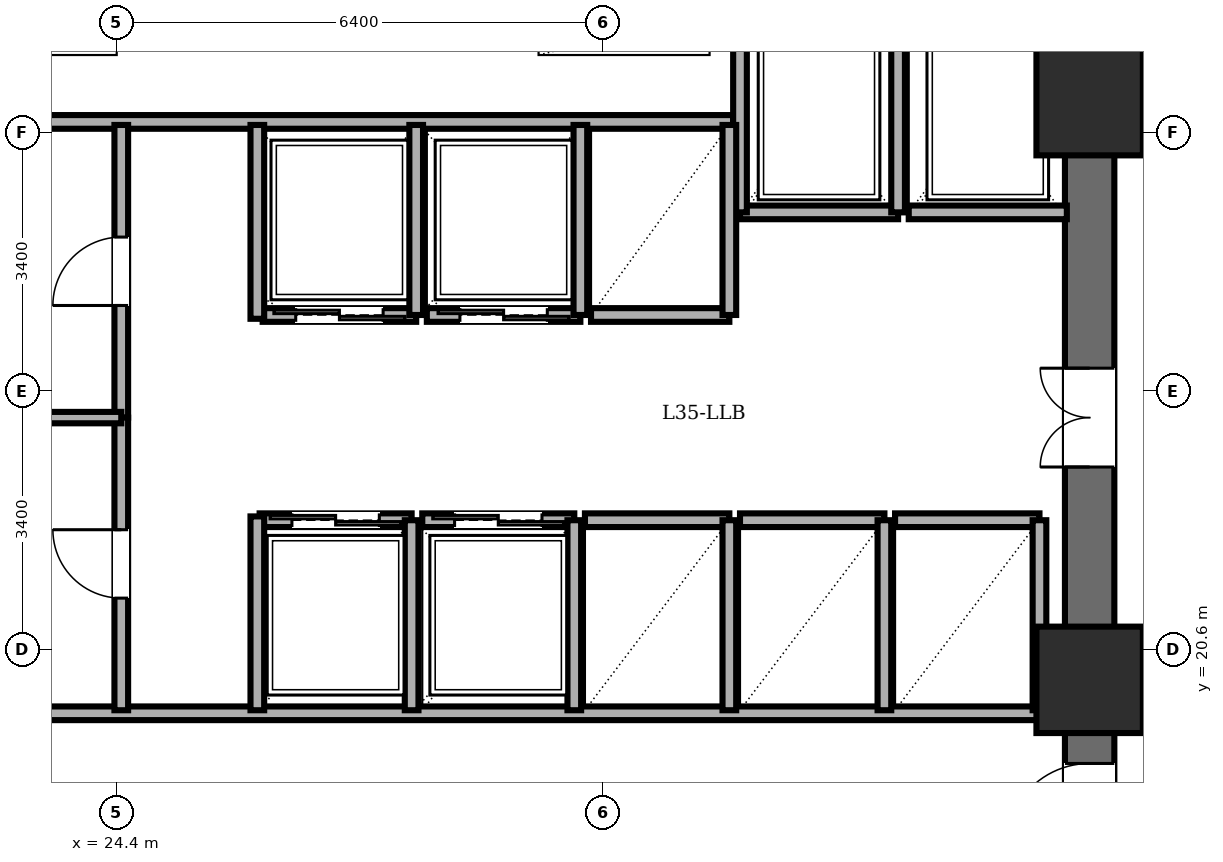
"""IFC4 building model, lengths in metres.
Left out: names, types, materials, properties, quantities, classifications, styles, units other than length and angle.
Written with IfcOpenShell. Run it as: python <this file> out.ifc"""

import sys

from ifc_helpers import new_model, si_unit, direction, frame, frame_2d, origin, origin_2d, place, context, subcontext, project, spatial, rectangle, extrude, element, fill, save


model = new_model("IFC4")
c1 = context("Model", 3, precision=1e-05, world=origin(), true_north=direction((0.0, 1.0)))
c2 = subcontext(c1, "Body", "Model", "MODEL_VIEW")
j1 = project(units=[si_unit("LENGTHUNIT", "METRE"), si_unit("PLANEANGLEUNIT", "RADIAN")], contexts=[c1])
p1 = place(None, origin())
s1 = spatial("IfcSite", under=j1, at=p1, CompositionType="ELEMENT")
p2 = place(p1, origin())
s2 = spatial("IfcBuilding", under=s1, at=p2, CompositionType="ELEMENT")
p3 = place(p2, frame((0.0, 0.0, 133.1)))
s3 = spatial("IfcBuildingStorey", under=s2, at=p3, CompositionType="ELEMENT", Elevation=133.1)
for number, where, z_axis, x_axis in (
    (1, (37.2, 20.2, 0.0), (0.0, 0.0, 1.0), (1.0, 0.0, 0.0)),
    (2, (37.2, 27.8, 0.0), (0.0, 0.0, 1.0), (1.0, 0.0, 0.0)),
):
    element("IfcColumn", number, at=place(p3, frame(where, z_axis=z_axis, x_axis=x_axis)), inside=s3, PredefinedType="COLUMN", context=c2, shape_type="SweptSolid", body=[
        extrude(rectangle(XDim=1.4, YDim=1.4, at=origin_2d()), origin(), (0.0, 0.0, 1.0), 5.6),
    ])
p4 = place(p3, frame((37.2, 14.4, 0.0), z_axis=(0.0, 0.0, 1.0), x_axis=(0.0, 1.0, 0.0)))
e3 = element("IfcWall", 3, at=p4, inside=s3, PredefinedType="SHEAR", context=c2, shape_type="SweptSolid", body=[
    extrude(rectangle(XDim=19.2, YDim=0.65, at=frame_2d((9.6, 0.0))), origin(), (0.0, 0.0, 1.0), 5.36),
])
p5 = place(p4, frame((15.8, 0.0, 0.0)))
e4 = element("IfcOpeningElement", 4, at=p5, cuts=e3, PredefinedType="OPENING", context=c2, shape_type="SweptSolid", body=[
    extrude(rectangle(XDim=1.15, YDim=2.15, at=frame_2d((0.575, 1.075))), frame((0.0, 0.335, 0.0), z_axis=(0.0, -1.0, 0.0), x_axis=(1.0, 0.0, 0.0)), (0.0, 0.0, 1.0), 0.67),
])
p6 = place(p4, frame((3.6, 0.0, 0.0)))
e5 = element("IfcOpeningElement", 5, at=p6, cuts=e3, PredefinedType="OPENING", context=c2, shape_type="SweptSolid", body=[
    extrude(rectangle(XDim=1.1, YDim=2.15, at=frame_2d((0.55, 1.075))), frame((0.0, 0.335, 0.0), z_axis=(0.0, -1.0, 0.0), x_axis=(1.0, 0.0, 0.0)), (0.0, 0.0, 1.0), 0.67),
])
p7 = place(p4, frame((8.6, 0.0, 0.0)))
e6 = element("IfcOpeningElement", 6, at=p7, cuts=e3, PredefinedType="OPENING", context=c2, shape_type="SweptSolid", body=[
    extrude(rectangle(XDim=1.3, YDim=2.2, at=frame_2d((0.65, 1.1))), frame((0.0, 0.335, 0.0), z_axis=(0.0, -1.0, 0.0), x_axis=(1.0, 0.0, 0.0)), (0.0, 0.0, 1.0), 0.67),
])
p8 = place(p3, frame((21.95, 27.54, 0.0), z_axis=(0.0, 0.0, 1.0), x_axis=(1.0, 0.0, 0.0)))
e7 = element("IfcWall", 7, at=p8, inside=s3, PredefinedType="PARTITIONING", context=c2, shape_type="SweptSolid", body=[
    extrude(rectangle(XDim=10.56, YDim=0.18, at=frame_2d((5.28, 0.0))), origin(), (0.0, 0.0, 1.0), 5.36),
])
p9 = place(p3, frame((21.95, 19.76, 0.0), z_axis=(0.0, 0.0, 1.0), x_axis=(1.0, 0.0, 0.0)))
e8 = element("IfcWall", 8, at=p9, inside=s3, PredefinedType="PARTITIONING", context=c2, shape_type="SweptSolid", body=[
    extrude(rectangle(XDim=14.87, YDim=0.18, at=frame_2d((7.435, 0.0))), origin(), (0.0, 0.0, 1.0), 5.36),
])
p10 = place(p3, frame((34.68, 26.35, 0.0), z_axis=(0.0, 0.0, 1.0), x_axis=(-1.0, 0.0, 0.0)))
e9 = element("IfcWall", 9, at=p10, inside=s3, PredefinedType="PARTITIONING", context=c2, shape_type="SweptSolid", body=[
    extrude(rectangle(XDim=2.08, YDim=0.18, at=frame_2d((1.04, 0.0))), origin(), (0.0, 0.0, 1.0), 5.36),
])
for number, where, z_axis, x_axis in (
    (10, (34.68, 26.35, 0.0), (0.0, 0.0, 1.0), (0.0, 1.0, 0.0)),
    (11, (32.6, 29.08, 0.0), (0.0, 0.0, 1.0), (0.0, -1.0, 0.0)),
):
    element("IfcWall", number, at=place(p3, frame(where, z_axis=z_axis, x_axis=x_axis)), inside=s3, PredefinedType="PARTITIONING", context=c2, shape_type="SweptSolid", body=[
        extrude(rectangle(XDim=2.73, YDim=0.18, at=frame_2d((1.365, 0.0))), origin(), (0.0, 0.0, 1.0), 5.36),
    ])
p11 = place(p3, frame((36.9, 26.35, 0.0), z_axis=(0.0, 0.0, 1.0), x_axis=(-1.0, 0.0, 0.0)))
e12 = element("IfcWall", 12, at=p11, inside=s3, PredefinedType="PARTITIONING", context=c2, shape_type="SweptSolid", body=[
    extrude(rectangle(XDim=2.08, YDim=0.18, at=frame_2d((1.04, 0.0))), origin(), (0.0, 0.0, 1.0), 5.36),
])
p12 = place(p3, frame((28.34, 25.0, 0.0), z_axis=(0.0, 0.0, 1.0), x_axis=(-1.0, 0.0, 0.0)))
e13 = element("IfcWall", 13, at=p12, inside=s3, PredefinedType="PARTITIONING", context=c2, shape_type="SweptSolid", body=[
    extrude(rectangle(XDim=2.02, YDim=0.18, at=frame_2d((1.01, 0.0))), origin(), (0.0, 0.0, 1.0), 5.36),
])
p13 = place(p12, frame((0.435, 0.0, 0.0)))
e14 = element("IfcOpeningElement", 14, at=p13, cuts=e13, PredefinedType="OPENING", context=c2, shape_type="SweptSolid", body=[
    extrude(rectangle(XDim=1.15, YDim=2.2, at=frame_2d((0.575, 1.1))), frame((0.0, 0.1, 0.0), z_axis=(0.0, -1.0, 0.0), x_axis=(1.0, 0.0, 0.0)), (0.0, 0.0, 1.0), 0.2),
])
p14 = place(p3, frame((28.34, 25.0, 0.0), z_axis=(0.0, 0.0, 1.0), x_axis=(0.0, 1.0, 0.0)))
e15 = element("IfcWall", 15, at=p14, inside=s3, PredefinedType="PARTITIONING", context=c2, shape_type="SweptSolid", body=[
    extrude(rectangle(XDim=2.5, YDim=0.18, at=frame_2d((1.25, 0.0))), origin(), (0.0, 0.0, 1.0), 5.36),
])
p15 = place(p3, frame((30.5, 25.0, 0.0), z_axis=(0.0, 0.0, 1.0), x_axis=(-1.0, 0.0, 0.0)))
e16 = element("IfcWall", 16, at=p15, inside=s3, PredefinedType="PARTITIONING", context=c2, shape_type="SweptSolid", body=[
    extrude(rectangle(XDim=2.02, YDim=0.18, at=frame_2d((1.01, 0.0))), origin(), (0.0, 0.0, 1.0), 5.36),
])
p16 = place(p15, frame((0.435, 0.0, 0.0)))
e17 = element("IfcOpeningElement", 17, at=p16, cuts=e16, PredefinedType="OPENING", context=c2, shape_type="SweptSolid", body=[
    extrude(rectangle(XDim=1.15, YDim=2.2, at=frame_2d((0.575, 1.1))), frame((0.0, 0.1, 0.0), z_axis=(0.0, -1.0, 0.0), x_axis=(1.0, 0.0, 0.0)), (0.0, 0.0, 1.0), 0.2),
])
p17 = place(p3, frame((30.5, 25.0, 0.0), z_axis=(0.0, 0.0, 1.0), x_axis=(0.0, 1.0, 0.0)))
e18 = element("IfcWall", 18, at=p17, inside=s3, PredefinedType="PARTITIONING", context=c2, shape_type="SweptSolid", body=[
    extrude(rectangle(XDim=2.5, YDim=0.18, at=frame_2d((1.25, 0.0))), origin(), (0.0, 0.0, 1.0), 5.36),
])
p18 = place(p3, frame((26.28, 22.3, 0.0), z_axis=(0.0, 0.0, 1.0), x_axis=(1.0, 0.0, 0.0)))
e19 = element("IfcWall", 19, at=p18, inside=s3, PredefinedType="PARTITIONING", context=c2, shape_type="SweptSolid", body=[
    extrude(rectangle(XDim=2.0, YDim=0.18, at=frame_2d((1.0, 0.0))), origin(), (0.0, 0.0, 1.0), 5.36),
])
p19 = place(p18, frame((0.425, 0.0, 0.0)))
e20 = element("IfcOpeningElement", 20, at=p19, cuts=e19, PredefinedType="OPENING", context=c2, shape_type="SweptSolid", body=[
    extrude(rectangle(XDim=1.15, YDim=2.2, at=frame_2d((0.575, 1.1))), frame((0.0, 0.1, 0.0), z_axis=(0.0, -1.0, 0.0), x_axis=(1.0, 0.0, 0.0)), (0.0, 0.0, 1.0), 0.2),
])
p20 = place(p3, frame((28.28, 19.8, 0.0), z_axis=(0.0, 0.0, 1.0), x_axis=(0.0, 1.0, 0.0)))
e21 = element("IfcWall", 21, at=p20, inside=s3, PredefinedType="PARTITIONING", context=c2, shape_type="SweptSolid", body=[
    extrude(rectangle(XDim=2.5, YDim=0.18, at=frame_2d((1.25, 0.0))), origin(), (0.0, 0.0, 1.0), 5.36),
])
p21 = place(p3, frame((28.42, 22.3, 0.0), z_axis=(0.0, 0.0, 1.0), x_axis=(1.0, 0.0, 0.0)))
e22 = element("IfcWall", 22, at=p21, inside=s3, PredefinedType="PARTITIONING", context=c2, shape_type="SweptSolid", body=[
    extrude(rectangle(XDim=2.0, YDim=0.18, at=frame_2d((1.0, 0.0))), origin(), (0.0, 0.0, 1.0), 5.36),
])
p22 = place(p21, frame((0.425, 0.0, 0.0)))
e23 = element("IfcOpeningElement", 23, at=p22, cuts=e22, PredefinedType="OPENING", context=c2, shape_type="SweptSolid", body=[
    extrude(rectangle(XDim=1.15, YDim=2.2, at=frame_2d((0.575, 1.1))), frame((0.0, 0.1, 0.0), z_axis=(0.0, -1.0, 0.0), x_axis=(1.0, 0.0, 0.0)), (0.0, 0.0, 1.0), 0.2),
])
p23 = place(p3, frame((30.42, 19.8, 0.0), z_axis=(0.0, 0.0, 1.0), x_axis=(0.0, 1.0, 0.0)))
e24 = element("IfcWall", 24, at=p23, inside=s3, PredefinedType="PARTITIONING", context=c2, shape_type="SweptSolid", body=[
    extrude(rectangle(XDim=2.5, YDim=0.18, at=frame_2d((1.25, 0.0))), origin(), (0.0, 0.0, 1.0), 5.36),
])
p24 = place(p3, frame((32.46, 25.0, 0.0), z_axis=(0.0, 0.0, 1.0), x_axis=(-1.0, 0.0, 0.0)))
e25 = element("IfcWall", 25, at=p24, inside=s3, PredefinedType="PARTITIONING", context=c2, shape_type="SweptSolid", body=[
    extrude(rectangle(XDim=1.82, YDim=0.18, at=frame_2d((0.91, 0.0))), origin(), (0.0, 0.0, 1.0), 5.36),
])
p25 = place(p3, frame((32.46, 25.0, 0.0), z_axis=(0.0, 0.0, 1.0), x_axis=(0.0, 1.0, 0.0)))
e26 = element("IfcWall", 26, at=p25, inside=s3, PredefinedType="PARTITIONING", context=c2, shape_type="SweptSolid", body=[
    extrude(rectangle(XDim=2.5, YDim=0.18, at=frame_2d((1.25, 0.0))), origin(), (0.0, 0.0, 1.0), 5.36),
])
p26 = place(p3, frame((30.56, 22.3, 0.0), z_axis=(0.0, 0.0, 1.0), x_axis=(1.0, 0.0, 0.0)))
e27 = element("IfcWall", 27, at=p26, inside=s3, PredefinedType="PARTITIONING", context=c2, shape_type="SweptSolid", body=[
    extrude(rectangle(XDim=1.9, YDim=0.18, at=frame_2d((0.95, 0.0))), origin(), (0.0, 0.0, 1.0), 5.36),
])
p27 = place(p3, frame((32.46, 19.8, 0.0), z_axis=(0.0, 0.0, 1.0), x_axis=(0.0, 1.0, 0.0)))
e28 = element("IfcWall", 28, at=p27, inside=s3, PredefinedType="PARTITIONING", context=c2, shape_type="SweptSolid", body=[
    extrude(rectangle(XDim=2.5, YDim=0.18, at=frame_2d((1.25, 0.0))), origin(), (0.0, 0.0, 1.0), 5.36),
])
p28 = place(p3, frame((32.6, 22.3, 0.0), z_axis=(0.0, 0.0, 1.0), x_axis=(1.0, 0.0, 0.0)))
e29 = element("IfcWall", 29, at=p28, inside=s3, PredefinedType="PARTITIONING", context=c2, shape_type="SweptSolid", body=[
    extrude(rectangle(XDim=1.9, YDim=0.18, at=frame_2d((0.95, 0.0))), origin(), (0.0, 0.0, 1.0), 5.36),
])
p29 = place(p3, frame((34.5, 19.8, 0.0), z_axis=(0.0, 0.0, 1.0), x_axis=(0.0, 1.0, 0.0)))
e30 = element("IfcWall", 30, at=p29, inside=s3, PredefinedType="PARTITIONING", context=c2, shape_type="SweptSolid", body=[
    extrude(rectangle(XDim=2.5, YDim=0.18, at=frame_2d((1.25, 0.0))), origin(), (0.0, 0.0, 1.0), 5.36),
])
p30 = place(p3, frame((34.64, 22.3, 0.0), z_axis=(0.0, 0.0, 1.0), x_axis=(1.0, 0.0, 0.0)))
e31 = element("IfcWall", 31, at=p30, inside=s3, PredefinedType="PARTITIONING", context=c2, shape_type="SweptSolid", body=[
    extrude(rectangle(XDim=1.9, YDim=0.18, at=frame_2d((0.95, 0.0))), origin(), (0.0, 0.0, 1.0), 5.36),
])
p31 = place(p3, frame((36.54, 19.8, 0.0), z_axis=(0.0, 0.0, 1.0), x_axis=(0.0, 1.0, 0.0)))
e32 = element("IfcWall", 32, at=p31, inside=s3, PredefinedType="PARTITIONING", context=c2, shape_type="SweptSolid", body=[
    extrude(rectangle(XDim=2.5, YDim=0.18, at=frame_2d((1.25, 0.0))), origin(), (0.0, 0.0, 1.0), 5.36),
])
p32 = place(p3, frame((24.46, 23.65, 0.0), z_axis=(0.0, 0.0, 1.0), x_axis=(0.0, 1.0, 0.0)))
e33 = element("IfcWall", 33, at=p32, inside=s3, PredefinedType="PARTITIONING", context=c2, shape_type="SweptSolid", body=[
    extrude(rectangle(XDim=3.85, YDim=0.18, at=frame_2d((1.925, 0.0))), origin(), (0.0, 0.0, 1.0), 5.36),
])
p33 = place(p32, frame((1.475, 0.0, 0.0)))
e34 = element("IfcOpeningElement", 34, at=p33, cuts=e33, PredefinedType="OPENING", context=c2, shape_type="SweptSolid", body=[
    extrude(rectangle(XDim=0.9, YDim=2.05, at=frame_2d((0.45, 1.025))), frame((0.0, 0.1, 0.0), z_axis=(0.0, -1.0, 0.0), x_axis=(1.0, 0.0, 0.0)), (0.0, 0.0, 1.0), 0.2),
])
p34 = place(p3, frame((24.46, 19.8, 0.0), z_axis=(0.0, 0.0, 1.0), x_axis=(0.0, 1.0, 0.0)))
e35 = element("IfcWall", 35, at=p34, inside=s3, PredefinedType="PARTITIONING", context=c2, shape_type="SweptSolid", body=[
    extrude(rectangle(XDim=3.85, YDim=0.18, at=frame_2d((1.925, 0.0))), origin(), (0.0, 0.0, 1.0), 5.36),
])
p35 = place(p34, frame((1.475, 0.0, 0.0)))
e36 = element("IfcOpeningElement", 36, at=p35, cuts=e35, PredefinedType="OPENING", context=c2, shape_type="SweptSolid", body=[
    extrude(rectangle(XDim=0.9, YDim=2.05, at=frame_2d((0.45, 1.025))), frame((0.0, 0.1, 0.0), z_axis=(0.0, -1.0, 0.0), x_axis=(1.0, 0.0, 0.0)), (0.0, 0.0, 1.0), 0.2),
])
p36 = place(p3, frame((21.95, 23.65, 0.0), z_axis=(0.0, 0.0, 1.0), x_axis=(1.0, 0.0, 0.0)))
e37 = element("IfcWall", 37, at=p36, inside=s3, PredefinedType="PARTITIONING", context=c2, shape_type="SweptSolid", body=[
    extrude(rectangle(XDim=2.51, YDim=0.15, at=frame_2d((1.255, 0.0))), origin(), (0.0, 0.0, 1.0), 5.36),
])
for number, where, z_axis, x_axis in (
    (38, (26.25, 24.95, 0.0), (0.0, 0.0, 1.0), (0.0, 1.0, 0.0)),
    (39, (26.25, 19.8, 0.0), (0.0, 0.0, 1.0), (0.0, 1.0, 0.0)),
):
    element("IfcWall", number, at=place(p3, frame(where, z_axis=z_axis, x_axis=x_axis)), inside=s3, PredefinedType="PARTITIONING", context=c2, shape_type="SweptSolid", body=[
        extrude(rectangle(XDim=2.55, YDim=0.18, at=frame_2d((1.275, 0.0))), origin(), (0.0, 0.0, 1.0), 5.36),
    ])
p37 = place(p6, origin())
e40 = element("IfcDoor", 40, at=p37, inside=s3, OperationType="SINGLE_SWING_LEFT", PredefinedType="DOOR", context=c2, shape_type="SweptSolid", body=[
    extrude(rectangle(XDim=1.1, YDim=2.15, at=frame_2d((0.55, 1.075))), frame((0.0, 0.025, 0.0), z_axis=(0.0, -1.0, 0.0), x_axis=(1.0, 0.0, 0.0)), (0.0, 0.0, 1.0), 0.05),
])
fill(e5, e40)
p38 = place(p13, origin())
e41 = element("IfcDoor", 41, at=p38, inside=s3, OperationType="DOUBLE_DOOR_SLIDING", PredefinedType="DOOR", context=c2, shape_type="SweptSolid", body=[
    extrude(rectangle(XDim=1.15, YDim=2.2, at=frame_2d((0.575, 1.1))), frame((0.0, 0.025, 0.0), z_axis=(0.0, -1.0, 0.0), x_axis=(1.0, 0.0, 0.0)), (0.0, 0.0, 1.0), 0.05),
])
fill(e14, e41)
p39 = place(p16, origin())
e42 = element("IfcDoor", 42, at=p39, inside=s3, OperationType="DOUBLE_DOOR_SLIDING", PredefinedType="DOOR", context=c2, shape_type="SweptSolid", body=[
    extrude(rectangle(XDim=1.15, YDim=2.2, at=frame_2d((0.575, 1.1))), frame((0.0, 0.025, 0.0), z_axis=(0.0, -1.0, 0.0), x_axis=(1.0, 0.0, 0.0)), (0.0, 0.0, 1.0), 0.05),
])
fill(e17, e42)
p40 = place(p19, origin())
e43 = element("IfcDoor", 43, at=p40, inside=s3, OperationType="DOUBLE_DOOR_SLIDING", PredefinedType="DOOR", context=c2, shape_type="SweptSolid", body=[
    extrude(rectangle(XDim=1.15, YDim=2.2, at=frame_2d((0.575, 1.1))), frame((0.0, 0.025, 0.0), z_axis=(0.0, -1.0, 0.0), x_axis=(1.0, 0.0, 0.0)), (0.0, 0.0, 1.0), 0.05),
])
fill(e20, e43)
p41 = place(p22, origin())
e44 = element("IfcDoor", 44, at=p41, inside=s3, OperationType="DOUBLE_DOOR_SLIDING", PredefinedType="DOOR", context=c2, shape_type="SweptSolid", body=[
    extrude(rectangle(XDim=1.15, YDim=2.2, at=frame_2d((0.575, 1.1))), frame((0.0, 0.025, 0.0), z_axis=(0.0, -1.0, 0.0), x_axis=(1.0, 0.0, 0.0)), (0.0, 0.0, 1.0), 0.05),
])
fill(e23, e44)
p42 = place(p33, origin())
e45 = element("IfcDoor", 45, at=p42, inside=s3, OperationType="SINGLE_SWING_LEFT", PredefinedType="DOOR", context=c2, shape_type="SweptSolid", body=[
    extrude(rectangle(XDim=0.9, YDim=2.05, at=frame_2d((0.45, 1.025))), frame((0.0, 0.025, 0.0), z_axis=(0.0, -1.0, 0.0), x_axis=(1.0, 0.0, 0.0)), (0.0, 0.0, 1.0), 0.05),
])
fill(e34, e45)
p43 = place(p35, origin())
e46 = element("IfcDoor", 46, at=p43, inside=s3, OperationType="SINGLE_SWING_RIGHT", PredefinedType="DOOR", context=c2, shape_type="SweptSolid", body=[
    extrude(rectangle(XDim=0.9, YDim=2.05, at=frame_2d((0.45, 1.025))), frame((0.0, 0.025, 0.0), z_axis=(0.0, -1.0, 0.0), x_axis=(1.0, 0.0, 0.0)), (0.0, 0.0, 1.0), 0.05),
])
fill(e36, e46)
p44 = place(p7, origin())
e47 = element("IfcDoor", 47, at=p44, inside=s3, OperationType="DOUBLE_DOOR_SINGLE_SWING", PredefinedType="DOOR", context=c2, shape_type="SweptSolid", body=[
    extrude(rectangle(XDim=1.3, YDim=2.2, at=frame_2d((0.65, 1.1))), frame((0.0, 0.025, 0.0), z_axis=(0.0, -1.0, 0.0), x_axis=(1.0, 0.0, 0.0)), (0.0, 0.0, 1.0), 0.05),
])
fill(e6, e47)
save(model, sys.argv[1])
